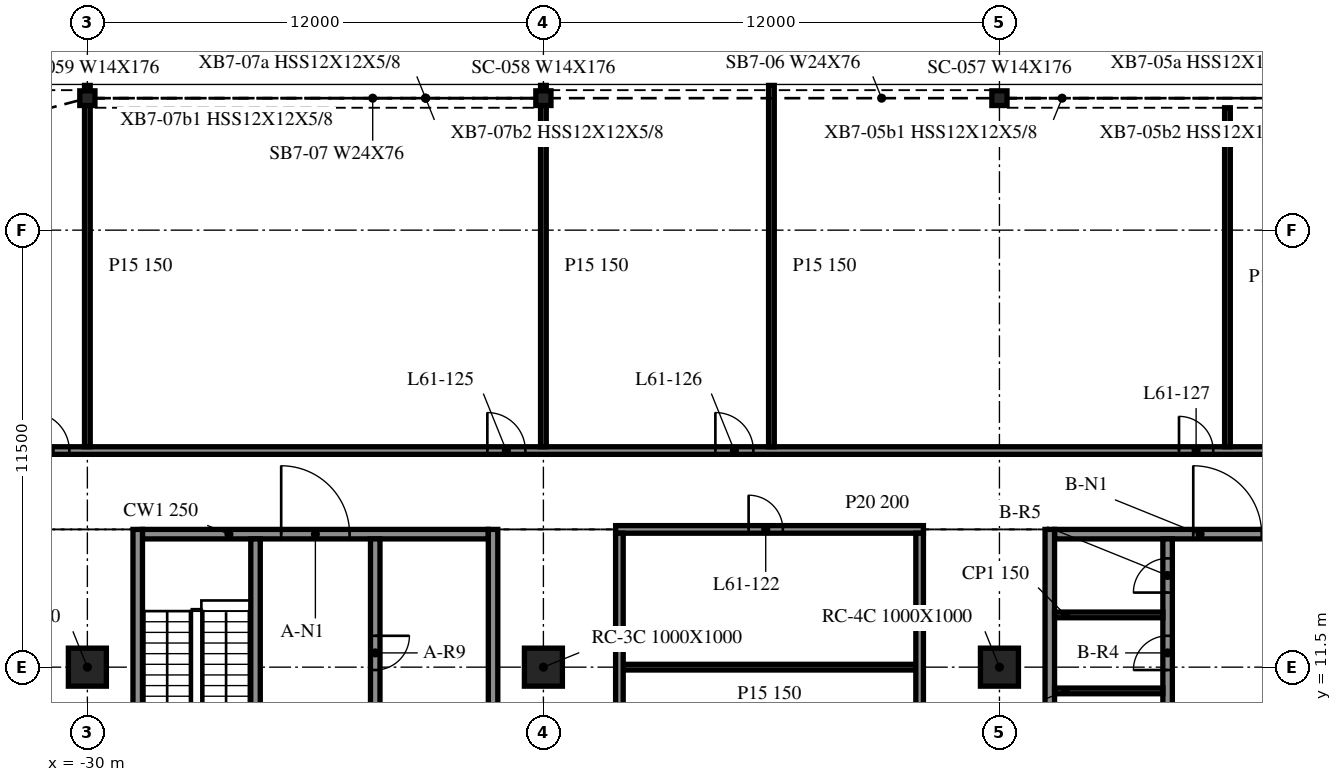
"""IFC4 building model, lengths in metres.
Left out: names, types, materials, properties, quantities, classifications, styles, units other than length and angle.
Written with IfcOpenShell. Run it as: python <this file> out.ifc"""

import sys

from ifc_helpers import new_model, si_unit, direction, frame, frame_2d, origin, origin_2d, place, context, subcontext, project, spatial, rectangle, i_section, extrude, element, fill, save


model = new_model("IFC4")
c1 = context("Model", 3, precision=1e-05, world=origin(), true_north=direction((0.0, 1.0)))
c2 = subcontext(c1, "Body", "Model", "MODEL_VIEW")
j1 = project(units=[si_unit("LENGTHUNIT", "METRE"), si_unit("PLANEANGLEUNIT", "RADIAN")], contexts=[c1])
p1 = place(None, origin())
s1 = spatial("IfcSite", under=j1, at=p1, CompositionType="ELEMENT")
p2 = place(p1, origin())
s2 = spatial("IfcBuilding", under=s1, at=p2, CompositionType="ELEMENT")
p3 = place(p2, frame((0.0, 0.0, 251.4)))
s3 = spatial("IfcBuildingStorey", under=s2, at=p3, CompositionType="ELEMENT", Elevation=251.4)
for number, where, z_axis, x_axis in (
    (1, (-30.0, 11.5, -0.34), (0.0, 0.0, 1.0), (1.0, 0.0, 0.0)),
    (2, (-18.0, 11.5, -0.34), (0.0, 0.0, 1.0), (1.0, 0.0, 0.0)),
    (3, (-6.0, 11.5, -0.34), (0.0, 0.0, 1.0), (1.0, 0.0, 0.0)),
):
    element("IfcColumn", number, at=place(p3, frame(where, z_axis=z_axis, x_axis=x_axis)), inside=s3, PredefinedType="COLUMN", context=c2, shape_type="SweptSolid", body=[
        extrude(rectangle(XDim=1.0, YDim=1.0, at=origin_2d()), origin(), (0.0, 0.0, 1.0), 3.8),
    ])
for number, where, z_axis, x_axis in (
    (4, (-6.0, 26.473, -0.34), (0.0, 0.0, 1.0), (1.0, 0.0, 0.0)),
    (5, (-18.0, 26.473, -0.34), (0.0, 0.0, 1.0), (1.0, 0.0, 0.0)),
    (6, (-30.0, 26.473, -0.34), (0.0, 0.0, 1.0), (1.0, 0.0, 0.0)),
):
    element("IfcColumn", number, at=place(p3, frame(where, z_axis=z_axis, x_axis=x_axis)), inside=s3, PredefinedType="COLUMN", context=c2, shape_type="SweptSolid", body=[
        extrude(i_section(OverallWidth=0.399, OverallDepth=0.386, WebThickness=0.021, FlangeThickness=0.033, at=origin_2d()), origin(), (0.0, 0.0, 1.0), 3.8),
    ])
for number, where, z_axis, x_axis in (
    (7, (-28.675, 15.125, 0.0), (0.0, 0.0, 1.0), (0.0, -1.0, 0.0)),
    (8, (-19.325, -9.125, 0.0), (0.0, 0.0, 1.0), (0.0, 1.0, 0.0)),
):
    element("IfcWall", number, at=place(p3, frame(where, z_axis=z_axis, x_axis=x_axis)), inside=s3, PredefinedType="SOLIDWALL", context=c2, shape_type="SweptSolid", body=[
        extrude(rectangle(XDim=24.25, YDim=0.25, at=frame_2d((12.125, 0.0))), origin(), (0.0, 0.0, 1.0), 3.46),
    ])
p4 = place(p3, frame((-28.55, 15.0, 0.0), z_axis=(0.0, 0.0, 1.0), x_axis=(1.0, 0.0, 0.0)))
e9 = element("IfcWall", 9, at=p4, inside=s3, PredefinedType="SOLIDWALL", context=c2, shape_type="SweptSolid", body=[
    extrude(rectangle(XDim=9.1, YDim=0.25, at=frame_2d((4.55, 0.0))), origin(), (0.0, 0.0, 1.0), 3.46),
])
p5 = place(p4, frame((3.65, 0.0, 0.0)))
e10 = element("IfcOpeningElement", 10, at=p5, cuts=e9, PredefinedType="OPENING", context=c2, shape_type="SweptSolid", body=[
    extrude(rectangle(XDim=1.8, YDim=2.1, at=frame_2d((0.9, 1.05))), frame((0.0, 0.135, 0.0), z_axis=(0.0, -1.0, 0.0), x_axis=(1.0, 0.0, 0.0)), (0.0, 0.0, 1.0), 0.27),
])
p6 = place(p3, frame((-25.575, 14.875, 0.0), z_axis=(0.0, 0.0, 1.0), x_axis=(0.0, -1.0, 0.0)))
e11 = element("IfcWall", 11, at=p6, inside=s3, PredefinedType="SOLIDWALL", context=c2, shape_type="SweptSolid", body=[
    extrude(rectangle(XDim=6.25, YDim=0.25, at=frame_2d((3.125, 0.0))), origin(), (0.0, 0.0, 1.0), 3.46),
])
p7 = place(p6, frame((4.85, 0.0, 0.0)))
e12 = element("IfcOpeningElement", 12, at=p7, cuts=e11, PredefinedType="OPENING", context=c2, shape_type="SweptSolid", body=[
    extrude(rectangle(XDim=1.0, YDim=2.1, at=frame_2d((0.5, 1.05))), frame((0.0, 0.135, 0.0), z_axis=(0.0, -1.0, 0.0), x_axis=(1.0, 0.0, 0.0)), (0.0, 0.0, 1.0), 0.27),
])
p8 = place(p3, frame((-22.425, 14.875, 0.0), z_axis=(0.0, 0.0, 1.0), x_axis=(0.0, -1.0, 0.0)))
e13 = element("IfcWall", 13, at=p8, inside=s3, PredefinedType="SOLIDWALL", context=c2, shape_type="SweptSolid", body=[
    extrude(rectangle(XDim=23.75, YDim=0.25, at=frame_2d((11.875, 0.0))), origin(), (0.0, 0.0, 1.0), 3.46),
])
p9 = place(p8, frame((14.15, 0.0, 0.0)))
e14 = element("IfcOpeningElement", 14, at=p9, cuts=e13, PredefinedType="OPENING", context=c2, shape_type="SweptSolid", body=[
    extrude(rectangle(XDim=0.9, YDim=2.1, at=frame_2d((0.45, 1.05))), frame((0.0, 0.135, 0.0), z_axis=(0.0, -1.0, 0.0), x_axis=(1.0, 0.0, 0.0)), (0.0, 0.0, 1.0), 0.27),
])
p10 = place(p8, frame((8.7, 0.0, 0.0)))
e15 = element("IfcOpeningElement", 15, at=p10, cuts=e13, PredefinedType="OPENING", context=c2, shape_type="SweptSolid", body=[
    extrude(rectangle(XDim=0.9, YDim=2.1, at=frame_2d((0.45, 1.05))), frame((0.0, 0.135, 0.0), z_axis=(0.0, -1.0, 0.0), x_axis=(1.0, 0.0, 0.0)), (0.0, 0.0, 1.0), 0.27),
])
p11 = place(p8, frame((22.137, 0.0, 0.0)))
e16 = element("IfcOpeningElement", 16, at=p11, cuts=e13, PredefinedType="OPENING", context=c2, shape_type="SweptSolid", body=[
    extrude(rectangle(XDim=0.9, YDim=2.1, at=frame_2d((0.45, 1.05))), frame((0.0, 0.135, 0.0), z_axis=(0.0, -1.0, 0.0), x_axis=(1.0, 0.0, 0.0)), (0.0, 0.0, 1.0), 0.27),
])
p12 = place(p8, frame((19.062, 0.0, 0.0)))
e17 = element("IfcOpeningElement", 17, at=p12, cuts=e13, PredefinedType="OPENING", context=c2, shape_type="SweptSolid", body=[
    extrude(rectangle(XDim=0.9, YDim=2.1, at=frame_2d((0.45, 1.05))), frame((0.0, 0.135, 0.0), z_axis=(0.0, -1.0, 0.0), x_axis=(1.0, 0.0, 0.0)), (0.0, 0.0, 1.0), 0.27),
])
p13 = place(p8, frame((2.55, 0.0, 0.0)))
e18 = element("IfcOpeningElement", 18, at=p13, cuts=e13, PredefinedType="OPENING", context=c2, shape_type="SweptSolid", body=[
    extrude(rectangle(XDim=0.9, YDim=2.1, at=frame_2d((0.45, 1.05))), frame((0.0, 0.135, 0.0), z_axis=(0.0, -1.0, 0.0), x_axis=(1.0, 0.0, 0.0)), (0.0, 0.0, 1.0), 0.27),
])
p14 = place(p3, frame((-4.675, 15.125, 0.0), z_axis=(0.0, 0.0, 1.0), x_axis=(0.0, -1.0, 0.0)))
e19 = element("IfcWall", 19, at=p14, inside=s3, PredefinedType="SOLIDWALL", context=c2, shape_type="SweptSolid", body=[
    extrude(rectangle(XDim=24.25, YDim=0.25, at=frame_2d((12.125, 0.0))), origin(), (0.0, 0.0, 1.0), 3.46),
])
p15 = place(p3, frame((-4.55, 15.0, 0.0), z_axis=(0.0, 0.0, 1.0), x_axis=(1.0, 0.0, 0.0)))
e20 = element("IfcWall", 20, at=p15, inside=s3, PredefinedType="SOLIDWALL", context=c2, shape_type="SweptSolid", body=[
    extrude(rectangle(XDim=9.1, YDim=0.25, at=frame_2d((4.55, 0.0))), origin(), (0.0, 0.0, 1.0), 3.46),
])
p16 = place(p15, frame((3.65, 0.0, 0.0)))
e21 = element("IfcOpeningElement", 21, at=p16, cuts=e20, PredefinedType="OPENING", context=c2, shape_type="SweptSolid", body=[
    extrude(rectangle(XDim=1.8, YDim=2.1, at=frame_2d((0.9, 1.05))), frame((0.0, 0.135, 0.0), z_axis=(0.0, -1.0, 0.0), x_axis=(1.0, 0.0, 0.0)), (0.0, 0.0, 1.0), 0.27),
])
p17 = place(p3, frame((-1.575, -8.875, 0.0), z_axis=(0.0, 0.0, 1.0), x_axis=(0.0, 1.0, 0.0)))
e22 = element("IfcWall", 22, at=p17, inside=s3, PredefinedType="SOLIDWALL", context=c2, shape_type="SweptSolid", body=[
    extrude(rectangle(XDim=23.75, YDim=0.25, at=frame_2d((11.875, 0.0))), origin(), (0.0, 0.0, 1.0), 3.46),
])
p18 = place(p17, frame((7.2, 0.0, 0.0)))
e23 = element("IfcOpeningElement", 23, at=p18, cuts=e22, PredefinedType="OPENING", context=c2, shape_type="SweptSolid", body=[
    extrude(rectangle(XDim=1.1, YDim=2.1, at=frame_2d((0.55, 1.05))), frame((0.0, 0.135, 0.0), z_axis=(0.0, -1.0, 0.0), x_axis=(1.0, 0.0, 0.0)), (0.0, 0.0, 1.0), 0.27),
])
p19 = place(p17, frame((9.95, 0.0, 0.0)))
e24 = element("IfcOpeningElement", 24, at=p19, cuts=e22, PredefinedType="OPENING", context=c2, shape_type="SweptSolid", body=[
    extrude(rectangle(XDim=1.1, YDim=2.1, at=frame_2d((0.55, 1.05))), frame((0.0, 0.135, 0.0), z_axis=(0.0, -1.0, 0.0), x_axis=(1.0, 0.0, 0.0)), (0.0, 0.0, 1.0), 0.27),
])
p20 = place(p17, frame((12.7, 0.0, 0.0)))
e25 = element("IfcOpeningElement", 25, at=p20, cuts=e22, PredefinedType="OPENING", context=c2, shape_type="SweptSolid", body=[
    extrude(rectangle(XDim=1.1, YDim=2.1, at=frame_2d((0.55, 1.05))), frame((0.0, 0.135, 0.0), z_axis=(0.0, -1.0, 0.0), x_axis=(1.0, 0.0, 0.0)), (0.0, 0.0, 1.0), 0.27),
])
p21 = place(p17, frame((15.45, 0.0, 0.0)))
e26 = element("IfcOpeningElement", 26, at=p21, cuts=e22, PredefinedType="OPENING", context=c2, shape_type="SweptSolid", body=[
    extrude(rectangle(XDim=1.1, YDim=2.1, at=frame_2d((0.55, 1.05))), frame((0.0, 0.135, 0.0), z_axis=(0.0, -1.0, 0.0), x_axis=(1.0, 0.0, 0.0)), (0.0, 0.0, 1.0), 0.27),
])
p22 = place(p17, frame((1.012, 0.0, 0.0)))
e27 = element("IfcOpeningElement", 27, at=p22, cuts=e22, PredefinedType="OPENING", context=c2, shape_type="SweptSolid", body=[
    extrude(rectangle(XDim=0.9, YDim=2.1, at=frame_2d((0.45, 1.05))), frame((0.0, 0.135, 0.0), z_axis=(0.0, -1.0, 0.0), x_axis=(1.0, 0.0, 0.0)), (0.0, 0.0, 1.0), 0.27),
])
p23 = place(p17, frame((4.087, 0.0, 0.0)))
e28 = element("IfcOpeningElement", 28, at=p23, cuts=e22, PredefinedType="OPENING", context=c2, shape_type="SweptSolid", body=[
    extrude(rectangle(XDim=0.9, YDim=2.1, at=frame_2d((0.45, 1.05))), frame((0.0, 0.135, 0.0), z_axis=(0.0, -1.0, 0.0), x_axis=(1.0, 0.0, 0.0)), (0.0, 0.0, 1.0), 0.27),
])
p24 = place(p17, frame((18.262, 0.0, 0.0)))
e29 = element("IfcOpeningElement", 29, at=p24, cuts=e22, PredefinedType="OPENING", context=c2, shape_type="SweptSolid", body=[
    extrude(rectangle(XDim=0.9, YDim=2.1, at=frame_2d((0.45, 1.05))), frame((0.0, 0.135, 0.0), z_axis=(0.0, -1.0, 0.0), x_axis=(1.0, 0.0, 0.0)), (0.0, 0.0, 1.0), 0.27),
])
p25 = place(p17, frame((20.3, 0.0, 0.0)))
e30 = element("IfcOpeningElement", 30, at=p25, cuts=e22, PredefinedType="OPENING", context=c2, shape_type="SweptSolid", body=[
    extrude(rectangle(XDim=0.9, YDim=2.1, at=frame_2d((0.45, 1.05))), frame((0.0, 0.135, 0.0), z_axis=(0.0, -1.0, 0.0), x_axis=(1.0, 0.0, 0.0)), (0.0, 0.0, 1.0), 0.27),
])
p26 = place(p17, frame((22.337, 0.0, 0.0)))
e31 = element("IfcOpeningElement", 31, at=p26, cuts=e22, PredefinedType="OPENING", context=c2, shape_type="SweptSolid", body=[
    extrude(rectangle(XDim=0.9, YDim=2.1, at=frame_2d((0.45, 1.05))), frame((0.0, 0.135, 0.0), z_axis=(0.0, -1.0, 0.0), x_axis=(1.0, 0.0, 0.0)), (0.0, 0.0, 1.0), 0.27),
])
for number, where, z_axis, x_axis in (
    (32, (-4.55, 10.875, 0.0), (0.0, 0.0, 1.0), (1.0, 0.0, 0.0)),
    (33, (-4.55, 12.875, 0.0), (0.0, 0.0, 1.0), (1.0, 0.0, 0.0)),
):
    element("IfcWall", number, at=place(p3, frame(where, z_axis=z_axis, x_axis=x_axis)), inside=s3, PredefinedType="PARTITIONING", context=c2, shape_type="SweptSolid", body=[
        extrude(rectangle(XDim=2.85, YDim=0.15, at=frame_2d((1.425, 0.0))), origin(), (0.0, 0.0, 1.0), 3.46),
    ])
p27 = place(p3, frame((-15.9, 11.5, 0.0), z_axis=(0.0, 0.0, 1.0), x_axis=(1.0, 0.0, 0.0)))
e34 = element("IfcWall", 34, at=p27, inside=s3, PredefinedType="PARTITIONING", context=c2, shape_type="SweptSolid", body=[
    extrude(rectangle(XDim=7.7, YDim=0.15, at=frame_2d((3.85, 0.0))), origin(), (0.0, 0.0, 1.0), 3.46),
])
p28 = place(p3, frame((-16.1, 15.125, 0.0), z_axis=(0.0, 0.0, 1.0), x_axis=(1.0, 0.0, 0.0)))
e35 = element("IfcWall", 35, at=p28, inside=s3, PredefinedType="PARTITIONING", context=c2, shape_type="SweptSolid", body=[
    extrude(rectangle(XDim=8.1, YDim=0.2, at=frame_2d((4.05, 0.0))), origin(), (0.0, 0.0, 1.0), 3.46),
])
p29 = place(p28, frame((3.5, 0.0, 0.0)))
e36 = element("IfcOpeningElement", 36, at=p29, cuts=e35, PredefinedType="OPENING", context=c2, shape_type="SweptSolid", body=[
    extrude(rectangle(XDim=0.9, YDim=2.1, at=frame_2d((0.45, 1.05))), frame((0.0, 0.11, 0.0), z_axis=(0.0, -1.0, 0.0), x_axis=(1.0, 0.0, 0.0)), (0.0, 0.0, 1.0), 0.22),
])
p30 = place(p3, frame((-41.975, 17.2, 0.0), z_axis=(0.0, 0.0, 1.0), x_axis=(1.0, 0.0, 0.0)))
e37 = element("IfcWall", 37, at=p30, inside=s3, PredefinedType="PARTITIONING", context=c2, shape_type="SweptSolid", body=[
    extrude(rectangle(XDim=95.95, YDim=0.2, at=frame_2d((47.975, 0.0))), origin(), (0.0, 0.0, 1.0), 3.46),
])
p31 = place(p30, frame((10.5, 0.0, 0.0)))
e38 = element("IfcOpeningElement", 38, at=p31, cuts=e37, PredefinedType="OPENING", context=c2, shape_type="SweptSolid", body=[
    extrude(rectangle(XDim=1.0, YDim=2.1, at=frame_2d((0.5, 1.05))), frame((0.0, 0.11, 0.0), z_axis=(0.0, -1.0, 0.0), x_axis=(1.0, 0.0, 0.0)), (0.0, 0.0, 1.0), 0.22),
])
p32 = place(p30, frame((22.5, 0.0, 0.0)))
e39 = element("IfcOpeningElement", 39, at=p32, cuts=e37, PredefinedType="OPENING", context=c2, shape_type="SweptSolid", body=[
    extrude(rectangle(XDim=1.0, YDim=2.1, at=frame_2d((0.5, 1.05))), frame((0.0, 0.11, 0.0), z_axis=(0.0, -1.0, 0.0), x_axis=(1.0, 0.0, 0.0)), (0.0, 0.0, 1.0), 0.22),
])
p33 = place(p30, frame((28.5, 0.0, 0.0)))
e40 = element("IfcOpeningElement", 40, at=p33, cuts=e37, PredefinedType="OPENING", context=c2, shape_type="SweptSolid", body=[
    extrude(rectangle(XDim=1.0, YDim=2.1, at=frame_2d((0.5, 1.05))), frame((0.0, 0.11, 0.0), z_axis=(0.0, -1.0, 0.0), x_axis=(1.0, 0.0, 0.0)), (0.0, 0.0, 1.0), 0.22),
])
p34 = place(p30, frame((40.7, 0.0, 0.0)))
e41 = element("IfcOpeningElement", 41, at=p34, cuts=e37, PredefinedType="OPENING", context=c2, shape_type="SweptSolid", body=[
    extrude(rectangle(XDim=0.9, YDim=2.1, at=frame_2d((0.45, 1.05))), frame((0.0, 0.11, 0.0), z_axis=(0.0, -1.0, 0.0), x_axis=(1.0, 0.0, 0.0)), (0.0, 0.0, 1.0), 0.22),
])
p35 = place(p30, frame((47.3, 0.0, 0.0)))
e42 = element("IfcOpeningElement", 42, at=p35, cuts=e37, PredefinedType="OPENING", context=c2, shape_type="SweptSolid", body=[
    extrude(rectangle(XDim=1.0, YDim=2.1, at=frame_2d((0.5, 1.05))), frame((0.0, 0.11, 0.0), z_axis=(0.0, -1.0, 0.0), x_axis=(1.0, 0.0, 0.0)), (0.0, 0.0, 1.0), 0.22),
])
p36 = place(p30, frame((54.1, 0.0, 0.0)))
e43 = element("IfcOpeningElement", 43, at=p36, cuts=e37, PredefinedType="OPENING", context=c2, shape_type="SweptSolid", body=[
    extrude(rectangle(XDim=0.9, YDim=2.1, at=frame_2d((0.45, 1.05))), frame((0.0, 0.11, 0.0), z_axis=(0.0, -1.0, 0.0), x_axis=(1.0, 0.0, 0.0)), (0.0, 0.0, 1.0), 0.22),
])
p37 = place(p30, frame((60.1, 0.0, 0.0)))
e44 = element("IfcOpeningElement", 44, at=p37, cuts=e37, PredefinedType="OPENING", context=c2, shape_type="SweptSolid", body=[
    extrude(rectangle(XDim=1.0, YDim=2.1, at=frame_2d((0.5, 1.05))), frame((0.0, 0.11, 0.0), z_axis=(0.0, -1.0, 0.0), x_axis=(1.0, 0.0, 0.0)), (0.0, 0.0, 1.0), 0.22),
])
p38 = place(p30, frame((72.1, 0.0, 0.0)))
e45 = element("IfcOpeningElement", 45, at=p38, cuts=e37, PredefinedType="OPENING", context=c2, shape_type="SweptSolid", body=[
    extrude(rectangle(XDim=1.0, YDim=2.1, at=frame_2d((0.5, 1.05))), frame((0.0, 0.11, 0.0), z_axis=(0.0, -1.0, 0.0), x_axis=(1.0, 0.0, 0.0)), (0.0, 0.0, 1.0), 0.22),
])
p39 = place(p30, frame((84.1, 0.0, 0.0)))
e46 = element("IfcOpeningElement", 46, at=p39, cuts=e37, PredefinedType="OPENING", context=c2, shape_type="SweptSolid", body=[
    extrude(rectangle(XDim=1.0, YDim=2.1, at=frame_2d((0.5, 1.05))), frame((0.0, 0.11, 0.0), z_axis=(0.0, -1.0, 0.0), x_axis=(1.0, 0.0, 0.0)), (0.0, 0.0, 1.0), 0.22),
])
p40 = place(p30, frame((90.1, 0.0, 0.0)))
e47 = element("IfcOpeningElement", 47, at=p40, cuts=e37, PredefinedType="OPENING", context=c2, shape_type="SweptSolid", body=[
    extrude(rectangle(XDim=0.9, YDim=2.1, at=frame_2d((0.45, 1.05))), frame((0.0, 0.11, 0.0), z_axis=(0.0, -1.0, 0.0), x_axis=(1.0, 0.0, 0.0)), (0.0, 0.0, 1.0), 0.22),
])
for number, where, z_axis, x_axis in (
    (48, (-30.0, 17.3, 0.0), (0.0, 0.0, 1.0), (0.0, 1.0, 0.0)),
    (49, (-18.0, 17.3, 0.0), (0.0, 0.0, 1.0), (0.0, 1.0, 0.0)),
):
    element("IfcWall", number, at=place(p3, frame(where, z_axis=z_axis, x_axis=x_axis)), inside=s3, PredefinedType="PARTITIONING", context=c2, shape_type="SweptSolid", body=[
        extrude(rectangle(XDim=9.509, YDim=0.15, at=frame_2d((4.754, 0.0))), origin(), (0.0, 0.0, 1.0), 3.46),
    ])
p41 = place(p3, frame((-16.0, -9.025, 0.0), z_axis=(0.0, 0.0, 1.0), x_axis=(0.0, 1.0, 0.0)))
e50 = element("IfcWall", 50, at=p41, inside=s3, PredefinedType="PARTITIONING", context=c2, shape_type="SweptSolid", body=[
    extrude(rectangle(XDim=24.05, YDim=0.2, at=frame_2d((12.025, 0.0))), origin(), (0.0, 0.0, 1.0), 3.46),
])
p42 = place(p41, frame((11.5, 0.0, 0.0)))
e51 = element("IfcOpeningElement", 51, at=p42, cuts=e50, PredefinedType="OPENING", context=c2, shape_type="SweptSolid", body=[
    extrude(rectangle(XDim=0.9, YDim=2.1, at=frame_2d((0.45, 1.05))), frame((0.0, 0.11, 0.0), z_axis=(0.0, -1.0, 0.0), x_axis=(1.0, 0.0, 0.0)), (0.0, 0.0, 1.0), 0.22),
])
p43 = place(p3, frame((-12.0, 17.3, 0.0), z_axis=(0.0, 0.0, 1.0), x_axis=(0.0, 1.0, 0.0)))
e52 = element("IfcWall", 52, at=p43, inside=s3, PredefinedType="PARTITIONING", context=c2, shape_type="SweptSolid", body=[
    extrude(rectangle(XDim=9.509, YDim=0.15, at=frame_2d((4.754, 0.0))), origin(), (0.0, 0.0, 1.0), 3.46),
])
p44 = place(p3, frame((-8.1, -9.025, 0.0), z_axis=(0.0, 0.0, 1.0), x_axis=(0.0, 1.0, 0.0)))
e53 = element("IfcWall", 53, at=p44, inside=s3, PredefinedType="PARTITIONING", context=c2, shape_type="SweptSolid", body=[
    extrude(rectangle(XDim=24.05, YDim=0.2, at=frame_2d((12.025, 0.0))), origin(), (0.0, 0.0, 1.0), 3.46),
])
p45 = place(p3, frame((0.0, 17.3, 0.0), z_axis=(0.0, 0.0, 1.0), x_axis=(0.0, 1.0, 0.0)))
e54 = element("IfcWall", 54, at=p45, inside=s3, PredefinedType="PARTITIONING", context=c2, shape_type="SweptSolid", body=[
    extrude(rectangle(XDim=8.921, YDim=0.15, at=frame_2d((4.46, 0.0))), origin(), (0.0, 0.0, 1.0), 3.46),
])
p46 = place(p5, origin())
e55 = element("IfcDoor", 55, at=p46, inside=s3, OperationType="DOUBLE_DOOR_SINGLE_SWING", PredefinedType="DOOR", context=c2, shape_type="SweptSolid", body=[
    extrude(rectangle(XDim=1.8, YDim=2.1, at=frame_2d((0.9, 1.05))), frame((0.0, 0.025, 0.0), z_axis=(0.0, -1.0, 0.0), x_axis=(1.0, 0.0, 0.0)), (0.0, 0.0, 1.0), 0.05),
])
fill(e10, e55)
p47 = place(p13, origin())
e56 = element("IfcDoor", 56, at=p47, inside=s3, OperationType="SINGLE_SWING_LEFT", PredefinedType="DOOR", context=c2, shape_type="SweptSolid", body=[
    extrude(rectangle(XDim=0.9, YDim=2.1, at=frame_2d((0.45, 1.05))), frame((0.0, 0.025, 0.0), z_axis=(0.0, -1.0, 0.0), x_axis=(1.0, 0.0, 0.0)), (0.0, 0.0, 1.0), 0.05),
])
fill(e18, e56)
p48 = place(p16, origin())
e57 = element("IfcDoor", 57, at=p48, inside=s3, OperationType="DOUBLE_DOOR_SINGLE_SWING", PredefinedType="DOOR", context=c2, shape_type="SweptSolid", body=[
    extrude(rectangle(XDim=1.8, YDim=2.1, at=frame_2d((0.9, 1.05))), frame((0.0, 0.025, 0.0), z_axis=(0.0, -1.0, 0.0), x_axis=(1.0, 0.0, 0.0)), (0.0, 0.0, 1.0), 0.05),
])
fill(e21, e57)
p49 = place(p25, origin())
e58 = element("IfcDoor", 58, at=p49, inside=s3, OperationType="SINGLE_SWING_RIGHT", PredefinedType="DOOR", context=c2, shape_type="SweptSolid", body=[
    extrude(rectangle(XDim=0.9, YDim=2.1, at=frame_2d((0.45, 1.05))), frame((0.0, 0.025, 0.0), z_axis=(0.0, -1.0, 0.0), x_axis=(1.0, 0.0, 0.0)), (0.0, 0.0, 1.0), 0.05),
])
fill(e30, e58)
p50 = place(p26, origin())
e59 = element("IfcDoor", 59, at=p50, inside=s3, OperationType="SINGLE_SWING_LEFT", PredefinedType="DOOR", context=c2, shape_type="SweptSolid", body=[
    extrude(rectangle(XDim=0.9, YDim=2.1, at=frame_2d((0.45, 1.05))), frame((0.0, 0.025, 0.0), z_axis=(0.0, -1.0, 0.0), x_axis=(1.0, 0.0, 0.0)), (0.0, 0.0, 1.0), 0.05),
])
fill(e31, e59)
p51 = place(p29, origin())
e60 = element("IfcDoor", 60, at=p51, inside=s3, OperationType="SINGLE_SWING_RIGHT", PredefinedType="DOOR", context=c2, shape_type="SweptSolid", body=[
    extrude(rectangle(XDim=0.9, YDim=2.1, at=frame_2d((0.45, 1.05))), frame((0.0, 0.025, 0.0), z_axis=(0.0, -1.0, 0.0), x_axis=(1.0, 0.0, 0.0)), (0.0, 0.0, 1.0), 0.05),
])
fill(e36, e60)
p52 = place(p31, origin())
e61 = element("IfcDoor", 61, at=p52, inside=s3, OperationType="SINGLE_SWING_LEFT", PredefinedType="DOOR", context=c2, shape_type="SweptSolid", body=[
    extrude(rectangle(XDim=1.0, YDim=2.1, at=frame_2d((0.5, 1.05))), frame((0.0, 0.025, 0.0), z_axis=(0.0, -1.0, 0.0), x_axis=(1.0, 0.0, 0.0)), (0.0, 0.0, 1.0), 0.05),
])
fill(e38, e61)
p53 = place(p32, origin())
e62 = element("IfcDoor", 62, at=p53, inside=s3, OperationType="SINGLE_SWING_LEFT", PredefinedType="DOOR", context=c2, shape_type="SweptSolid", body=[
    extrude(rectangle(XDim=1.0, YDim=2.1, at=frame_2d((0.5, 1.05))), frame((0.0, 0.025, 0.0), z_axis=(0.0, -1.0, 0.0), x_axis=(1.0, 0.0, 0.0)), (0.0, 0.0, 1.0), 0.05),
])
fill(e39, e62)
p54 = place(p33, origin())
e63 = element("IfcDoor", 63, at=p54, inside=s3, OperationType="SINGLE_SWING_LEFT", PredefinedType="DOOR", context=c2, shape_type="SweptSolid", body=[
    extrude(rectangle(XDim=1.0, YDim=2.1, at=frame_2d((0.5, 1.05))), frame((0.0, 0.025, 0.0), z_axis=(0.0, -1.0, 0.0), x_axis=(1.0, 0.0, 0.0)), (0.0, 0.0, 1.0), 0.05),
])
fill(e40, e63)
p55 = place(p34, origin())
e64 = element("IfcDoor", 64, at=p55, inside=s3, OperationType="SINGLE_SWING_LEFT", PredefinedType="DOOR", context=c2, shape_type="SweptSolid", body=[
    extrude(rectangle(XDim=0.9, YDim=2.1, at=frame_2d((0.45, 1.05))), frame((0.0, 0.025, 0.0), z_axis=(0.0, -1.0, 0.0), x_axis=(1.0, 0.0, 0.0)), (0.0, 0.0, 1.0), 0.05),
])
fill(e41, e64)
save(model, sys.argv[1])
